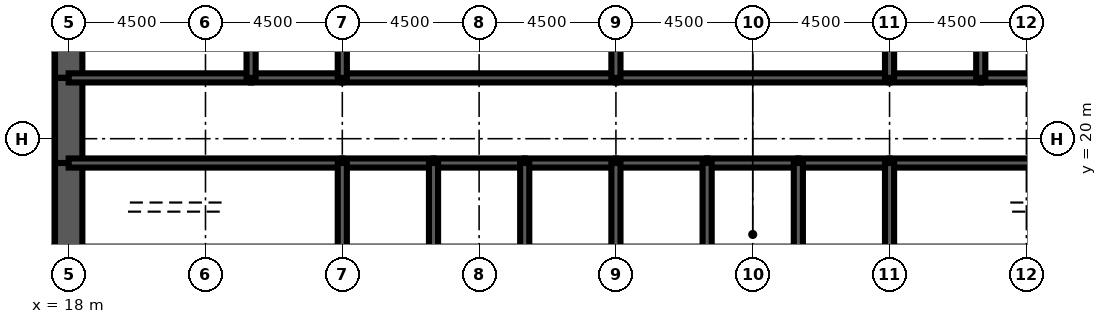
"""IFC4 building model, lengths in metres.
Left out: names, types, materials, properties, quantities, classifications, styles, units other than length and angle.
Written with IfcOpenShell. Run it as: python <this file> out.ifc"""

import sys

from ifc_helpers import new_model, si_unit, direction, frame, frame_2d, origin, place, context, subcontext, project, spatial, rectangle, extrude, element, fill, save


model = new_model("IFC4")
c1 = context("Model", 3, precision=1e-05, world=origin(), true_north=direction((0.0, 1.0)))
c2 = subcontext(c1, "Body", "Model", "MODEL_VIEW")
j1 = project(units=[si_unit("LENGTHUNIT", "METRE"), si_unit("PLANEANGLEUNIT", "RADIAN")], contexts=[c1])
p1 = place(None, origin())
s1 = spatial("IfcSite", under=j1, at=p1, CompositionType="ELEMENT")
p2 = place(p1, origin())
s2 = spatial("IfcBuilding", under=s1, at=p2, CompositionType="ELEMENT")
p3 = place(p2, frame((0.0, 0.0, 113.1)))
s3 = spatial("IfcBuildingStorey", under=s2, at=p3, CompositionType="ELEMENT", Elevation=113.1)
p4 = place(p3, frame((18.0, 26.0, 0.0), z_axis=(0.0, 0.0, 1.0), x_axis=(0.0, -1.0, 0.0)))
e1 = element("IfcWall", 1, at=p4, inside=s3, PredefinedType="SHEAR", context=c2, shape_type="SweptSolid", body=[
    extrude(rectangle(XDim=4.0, YDim=0.9, at=frame_2d((2.0, 0.0))), origin(), (0.0, 0.0, 1.0), 4.2),
])
p5 = place(p3, frame((18.0, 22.0, 0.0), z_axis=(0.0, 0.0, 1.0), x_axis=(0.0, -1.0, 0.0)))
e2 = element("IfcWall", 2, at=p5, inside=s3, PredefinedType="SHEAR", context=c2, shape_type="SweptSolid", body=[
    extrude(rectangle(XDim=2.8, YDim=0.9, at=frame_2d((1.4, 0.0))), origin(), (0.0, 0.0, 1.0), 4.2),
])
p6 = place(p5, frame((0.6, 0.0, 0.0)))
e3 = element("IfcOpeningElement", 3, at=p6, cuts=e2, PredefinedType="OPENING", context=c2, shape_type="SweptSolid", body=[
    extrude(rectangle(XDim=1.8, YDim=2.1, at=frame_2d((0.9, 1.05))), frame((0.0, 0.46, 0.0), z_axis=(0.0, -1.0, 0.0), x_axis=(1.0, 0.0, 0.0)), (0.0, 0.0, 1.0), 0.92),
])
p7 = place(p3, frame((18.0, 19.2, 0.0), z_axis=(0.0, 0.0, 1.0), x_axis=(0.0, -1.0, 0.0)))
e4 = element("IfcWall", 4, at=p7, inside=s3, PredefinedType="SHEAR", context=c2, shape_type="SweptSolid", body=[
    extrude(rectangle(XDim=3.2, YDim=0.9, at=frame_2d((1.6, 0.0))), origin(), (0.0, 0.0, 1.0), 4.2),
])
p8 = place(p3, frame((18.0, 19.2, 0.0), z_axis=(0.0, 0.0, 1.0), x_axis=(1.0, 0.0, 0.0)))
e5 = element("IfcWall", 5, at=p8, inside=s3, PredefinedType="SOLIDWALL", context=c2, shape_type="SweptSolid", body=[
    extrude(rectangle(XDim=9.0, YDim=0.3, at=frame_2d((4.5, 0.0))), origin(), (0.0, 0.0, 1.0), 4.2),
])
p9 = place(p8, frame((0.65, 0.0, 0.0)))
e6 = element("IfcOpeningElement", 6, at=p9, cuts=e5, PredefinedType="OPENING", context=c2, shape_type="SweptSolid", body=[
    extrude(rectangle(XDim=1.0, YDim=2.1, at=frame_2d((0.5, 1.05))), frame((0.0, 0.16, 0.0), z_axis=(0.0, -1.0, 0.0), x_axis=(1.0, 0.0, 0.0)), (0.0, 0.0, 1.0), 0.32),
])
p10 = place(p3, frame((27.0, 19.2, 0.0), z_axis=(0.0, 0.0, 1.0), x_axis=(1.0, 0.0, 0.0)))
e7 = element("IfcWall", 7, at=p10, inside=s3, PredefinedType="SOLIDWALL", context=c2, shape_type="SweptSolid", body=[
    extrude(rectangle(XDim=3.0, YDim=0.3, at=frame_2d((1.5, 0.0))), origin(), (0.0, 0.0, 1.0), 4.2),
])
p11 = place(p10, frame((0.95, 0.0, 0.0)))
e8 = element("IfcOpeningElement", 8, at=p11, cuts=e7, PredefinedType="OPENING", context=c2, shape_type="SweptSolid", body=[
    extrude(rectangle(XDim=1.1, YDim=2.2, at=frame_2d((0.55, 1.1))), frame((0.0, 0.16, 0.0), z_axis=(0.0, -1.0, 0.0), x_axis=(1.0, 0.0, 0.0)), (0.0, 0.0, 1.0), 0.32),
])
p12 = place(p3, frame((30.0, 19.2, 0.0), z_axis=(0.0, 0.0, 1.0), x_axis=(1.0, 0.0, 0.0)))
e9 = element("IfcWall", 9, at=p12, inside=s3, PredefinedType="SOLIDWALL", context=c2, shape_type="SweptSolid", body=[
    extrude(rectangle(XDim=3.0, YDim=0.3, at=frame_2d((1.5, 0.0))), origin(), (0.0, 0.0, 1.0), 4.2),
])
p13 = place(p12, frame((0.95, 0.0, 0.0)))
e10 = element("IfcOpeningElement", 10, at=p13, cuts=e9, PredefinedType="OPENING", context=c2, shape_type="SweptSolid", body=[
    extrude(rectangle(XDim=1.1, YDim=2.2, at=frame_2d((0.55, 1.1))), frame((0.0, 0.16, 0.0), z_axis=(0.0, -1.0, 0.0), x_axis=(1.0, 0.0, 0.0)), (0.0, 0.0, 1.0), 0.32),
])
p14 = place(p3, frame((33.0, 19.2, 0.0), z_axis=(0.0, 0.0, 1.0), x_axis=(1.0, 0.0, 0.0)))
e11 = element("IfcWall", 11, at=p14, inside=s3, PredefinedType="SOLIDWALL", context=c2, shape_type="SweptSolid", body=[
    extrude(rectangle(XDim=3.0, YDim=0.3, at=frame_2d((1.5, 0.0))), origin(), (0.0, 0.0, 1.0), 4.2),
])
p15 = place(p14, frame((0.95, 0.0, 0.0)))
e12 = element("IfcOpeningElement", 12, at=p15, cuts=e11, PredefinedType="OPENING", context=c2, shape_type="SweptSolid", body=[
    extrude(rectangle(XDim=1.1, YDim=2.2, at=frame_2d((0.55, 1.1))), frame((0.0, 0.16, 0.0), z_axis=(0.0, -1.0, 0.0), x_axis=(1.0, 0.0, 0.0)), (0.0, 0.0, 1.0), 0.32),
])
p16 = place(p3, frame((36.0, 19.2, 0.0), z_axis=(0.0, 0.0, 1.0), x_axis=(1.0, 0.0, 0.0)))
e13 = element("IfcWall", 13, at=p16, inside=s3, PredefinedType="SOLIDWALL", context=c2, shape_type="SweptSolid", body=[
    extrude(rectangle(XDim=3.0, YDim=0.3, at=frame_2d((1.5, 0.0))), origin(), (0.0, 0.0, 1.0), 4.2),
])
p17 = place(p16, frame((0.95, 0.0, 0.0)))
e14 = element("IfcOpeningElement", 14, at=p17, cuts=e13, PredefinedType="OPENING", context=c2, shape_type="SweptSolid", body=[
    extrude(rectangle(XDim=1.1, YDim=2.2, at=frame_2d((0.55, 1.1))), frame((0.0, 0.16, 0.0), z_axis=(0.0, -1.0, 0.0), x_axis=(1.0, 0.0, 0.0)), (0.0, 0.0, 1.0), 0.32),
])
p18 = place(p3, frame((39.0, 19.2, 0.0), z_axis=(0.0, 0.0, 1.0), x_axis=(1.0, 0.0, 0.0)))
e15 = element("IfcWall", 15, at=p18, inside=s3, PredefinedType="SOLIDWALL", context=c2, shape_type="SweptSolid", body=[
    extrude(rectangle(XDim=3.0, YDim=0.3, at=frame_2d((1.5, 0.0))), origin(), (0.0, 0.0, 1.0), 4.2),
])
p19 = place(p18, frame((1.0, 0.0, 0.0)))
e16 = element("IfcOpeningElement", 16, at=p19, cuts=e15, PredefinedType="OPENING", context=c2, shape_type="SweptSolid", body=[
    extrude(rectangle(XDim=1.0, YDim=2.1, at=frame_2d((0.5, 1.05))), frame((0.0, 0.16, 0.0), z_axis=(0.0, -1.0, 0.0), x_axis=(1.0, 0.0, 0.0)), (0.0, 0.0, 1.0), 0.32),
])
p20 = place(p3, frame((42.0, 19.2, 0.0), z_axis=(0.0, 0.0, 1.0), x_axis=(1.0, 0.0, 0.0)))
e17 = element("IfcWall", 17, at=p20, inside=s3, PredefinedType="SOLIDWALL", context=c2, shape_type="SweptSolid", body=[
    extrude(rectangle(XDim=3.0, YDim=0.3, at=frame_2d((1.5, 0.0))), origin(), (0.0, 0.0, 1.0), 4.2),
])
p21 = place(p3, frame((45.0, 19.2, 0.0), z_axis=(0.0, 0.0, 1.0), x_axis=(1.0, 0.0, 0.0)))
e18 = element("IfcWall", 18, at=p21, inside=s3, PredefinedType="SOLIDWALL", context=c2, shape_type="SweptSolid", body=[
    extrude(rectangle(XDim=9.0, YDim=0.3, at=frame_2d((4.5, 0.0))), origin(), (0.0, 0.0, 1.0), 4.2),
])
p22 = place(p21, frame((7.35, 0.0, 0.0)))
e19 = element("IfcOpeningElement", 19, at=p22, cuts=e18, PredefinedType="OPENING", context=c2, shape_type="SweptSolid", body=[
    extrude(rectangle(XDim=1.0, YDim=2.1, at=frame_2d((0.5, 1.05))), frame((0.0, 0.16, 0.0), z_axis=(0.0, -1.0, 0.0), x_axis=(1.0, 0.0, 0.0)), (0.0, 0.0, 1.0), 0.32),
])
p23 = place(p3, frame((18.0, 22.0, 0.0), z_axis=(0.0, 0.0, 1.0), x_axis=(1.0, 0.0, 0.0)))
e20 = element("IfcWall", 20, at=p23, inside=s3, PredefinedType="SOLIDWALL", context=c2, shape_type="SweptSolid", body=[
    extrude(rectangle(XDim=6.0, YDim=0.3, at=frame_2d((3.0, 0.0))), origin(), (0.0, 0.0, 1.0), 4.2),
])
p24 = place(p23, frame((4.4, 0.0, 0.0)))
e21 = element("IfcOpeningElement", 21, at=p24, cuts=e20, PredefinedType="OPENING", context=c2, shape_type="SweptSolid", body=[
    extrude(rectangle(XDim=1.0, YDim=2.1, at=frame_2d((0.5, 1.05))), frame((0.0, 0.16, 0.0), z_axis=(0.0, -1.0, 0.0), x_axis=(1.0, 0.0, 0.0)), (0.0, 0.0, 1.0), 0.32),
])
p25 = place(p23, frame((1.0, 0.0, 0.0)))
e22 = element("IfcOpeningElement", 22, at=p25, cuts=e20, PredefinedType="OPENING", context=c2, shape_type="SweptSolid", body=[
    extrude(rectangle(XDim=1.0, YDim=2.1, at=frame_2d((0.5, 1.05))), frame((0.0, 0.16, 0.0), z_axis=(0.0, -1.0, 0.0), x_axis=(1.0, 0.0, 0.0)), (0.0, 0.0, 1.0), 0.32),
])
p26 = place(p3, frame((24.0, 22.0, 0.0), z_axis=(0.0, 0.0, 1.0), x_axis=(1.0, 0.0, 0.0)))
e23 = element("IfcWall", 23, at=p26, inside=s3, PredefinedType="SOLIDWALL", context=c2, shape_type="SweptSolid", body=[
    extrude(rectangle(XDim=3.0, YDim=0.3, at=frame_2d((1.5, 0.0))), origin(), (0.0, 0.0, 1.0), 4.2),
])
p27 = place(p26, frame((1.0, 0.0, 0.0)))
e24 = element("IfcOpeningElement", 24, at=p27, cuts=e23, PredefinedType="OPENING", context=c2, shape_type="SweptSolid", body=[
    extrude(rectangle(XDim=1.0, YDim=2.1, at=frame_2d((0.5, 1.05))), frame((0.0, 0.16, 0.0), z_axis=(0.0, -1.0, 0.0), x_axis=(1.0, 0.0, 0.0)), (0.0, 0.0, 1.0), 0.32),
])
p28 = place(p3, frame((27.0, 22.0, 0.0), z_axis=(0.0, 0.0, 1.0), x_axis=(1.0, 0.0, 0.0)))
e25 = element("IfcWall", 25, at=p28, inside=s3, PredefinedType="SOLIDWALL", context=c2, shape_type="SweptSolid", body=[
    extrude(rectangle(XDim=9.0, YDim=0.3, at=frame_2d((4.5, 0.0))), origin(), (0.0, 0.0, 1.0), 4.2),
])
p29 = place(p28, frame((4.0, 0.0, 0.0)))
e26 = element("IfcOpeningElement", 26, at=p29, cuts=e25, PredefinedType="OPENING", context=c2, shape_type="SweptSolid", body=[
    extrude(rectangle(XDim=1.0, YDim=2.1, at=frame_2d((0.5, 1.05))), frame((0.0, 0.16, 0.0), z_axis=(0.0, -1.0, 0.0), x_axis=(1.0, 0.0, 0.0)), (0.0, 0.0, 1.0), 0.32),
])
p30 = place(p3, frame((36.0, 22.0, 0.0), z_axis=(0.0, 0.0, 1.0), x_axis=(1.0, 0.0, 0.0)))
e27 = element("IfcWall", 27, at=p30, inside=s3, PredefinedType="SOLIDWALL", context=c2, shape_type="SweptSolid", body=[
    extrude(rectangle(XDim=9.0, YDim=0.3, at=frame_2d((4.5, 0.0))), origin(), (0.0, 0.0, 1.0), 4.2),
])
p31 = place(p30, frame((4.0, 0.0, 0.0)))
e28 = element("IfcOpeningElement", 28, at=p31, cuts=e27, PredefinedType="OPENING", context=c2, shape_type="SweptSolid", body=[
    extrude(rectangle(XDim=1.0, YDim=2.1, at=frame_2d((0.5, 1.05))), frame((0.0, 0.16, 0.0), z_axis=(0.0, -1.0, 0.0), x_axis=(1.0, 0.0, 0.0)), (0.0, 0.0, 1.0), 0.32),
])
p32 = place(p3, frame((45.0, 22.0, 0.0), z_axis=(0.0, 0.0, 1.0), x_axis=(1.0, 0.0, 0.0)))
e29 = element("IfcWall", 29, at=p32, inside=s3, PredefinedType="SOLIDWALL", context=c2, shape_type="SweptSolid", body=[
    extrude(rectangle(XDim=3.0, YDim=0.3, at=frame_2d((1.5, 0.0))), origin(), (0.0, 0.0, 1.0), 4.2),
])
p33 = place(p32, frame((1.0, 0.0, 0.0)))
e30 = element("IfcOpeningElement", 30, at=p33, cuts=e29, PredefinedType="OPENING", context=c2, shape_type="SweptSolid", body=[
    extrude(rectangle(XDim=1.0, YDim=2.1, at=frame_2d((0.5, 1.05))), frame((0.0, 0.16, 0.0), z_axis=(0.0, -1.0, 0.0), x_axis=(1.0, 0.0, 0.0)), (0.0, 0.0, 1.0), 0.32),
])
p34 = place(p3, frame((48.0, 22.0, 0.0), z_axis=(0.0, 0.0, 1.0), x_axis=(1.0, 0.0, 0.0)))
e31 = element("IfcWall", 31, at=p34, inside=s3, PredefinedType="SOLIDWALL", context=c2, shape_type="SweptSolid", body=[
    extrude(rectangle(XDim=6.0, YDim=0.3, at=frame_2d((3.0, 0.0))), origin(), (0.0, 0.0, 1.0), 4.2),
])
p35 = place(p34, frame((2.0, 0.0, 0.0)))
e32 = element("IfcOpeningElement", 32, at=p35, cuts=e31, PredefinedType="OPENING", context=c2, shape_type="SweptSolid", body=[
    extrude(rectangle(XDim=1.0, YDim=2.1, at=frame_2d((0.5, 1.05))), frame((0.0, 0.16, 0.0), z_axis=(0.0, -1.0, 0.0), x_axis=(1.0, 0.0, 0.0)), (0.0, 0.0, 1.0), 0.32),
])
p36 = place(p34, frame((4.0, 0.0, 0.0)))
e33 = element("IfcOpeningElement", 33, at=p36, cuts=e31, PredefinedType="OPENING", context=c2, shape_type="SweptSolid", body=[
    extrude(rectangle(XDim=1.0, YDim=2.1, at=frame_2d((0.5, 1.05))), frame((0.0, 0.16, 0.0), z_axis=(0.0, -1.0, 0.0), x_axis=(1.0, 0.0, 0.0)), (0.0, 0.0, 1.0), 0.32),
])
for number, where, z_axis, x_axis in (
    (34, (27.0, 16.0, 0.0), (0.0, 0.0, 1.0), (0.0, 1.0, 0.0)),
    (35, (30.0, 16.0, 0.0), (0.0, 0.0, 1.0), (0.0, 1.0, 0.0)),
    (36, (33.0, 16.0, 0.0), (0.0, 0.0, 1.0), (0.0, 1.0, 0.0)),
    (37, (36.0, 16.0, 0.0), (0.0, 0.0, 1.0), (0.0, 1.0, 0.0)),
    (38, (39.0, 16.0, 0.0), (0.0, 0.0, 1.0), (0.0, 1.0, 0.0)),
    (39, (42.0, 16.0, 0.0), (0.0, 0.0, 1.0), (0.0, 1.0, 0.0)),
    (40, (45.0, 16.0, 0.0), (0.0, 0.0, 1.0), (0.0, 1.0, 0.0)),
):
    element("IfcWall", number, at=place(p3, frame(where, z_axis=z_axis, x_axis=x_axis)), inside=s3, PredefinedType="SOLIDWALL", context=c2, shape_type="SweptSolid", body=[
        extrude(rectangle(XDim=3.2, YDim=0.3, at=frame_2d((1.6, 0.0))), origin(), (0.0, 0.0, 1.0), 4.2),
    ])
for number, where, z_axis, x_axis in (
    (41, (24.0, 22.0, 0.0), (0.0, 0.0, 1.0), (0.0, 1.0, 0.0)),
    (42, (27.0, 22.0, 0.0), (0.0, 0.0, 1.0), (0.0, 1.0, 0.0)),
    (43, (36.0, 22.0, 0.0), (0.0, 0.0, 1.0), (0.0, 1.0, 0.0)),
    (44, (45.0, 22.0, 0.0), (0.0, 0.0, 1.0), (0.0, 1.0, 0.0)),
    (45, (48.0, 22.0, 0.0), (0.0, 0.0, 1.0), (0.0, 1.0, 0.0)),
):
    element("IfcWall", number, at=place(p3, frame(where, z_axis=z_axis, x_axis=x_axis)), inside=s3, PredefinedType="SOLIDWALL", context=c2, shape_type="SweptSolid", body=[
        extrude(rectangle(XDim=4.0, YDim=0.3, at=frame_2d((2.0, 0.0))), origin(), (0.0, 0.0, 1.0), 4.2),
    ])
p37 = place(p3, frame((39.15, 17.4, 0.0), z_axis=(0.0, 0.0, 1.0), x_axis=(1.0, 0.0, 0.0)))
e46 = element("IfcWall", 46, at=p37, inside=s3, PredefinedType="SOLIDWALL", context=c2, shape_type="SweptSolid", body=[
    extrude(rectangle(XDim=2.7, YDim=0.3, at=frame_2d((1.35, 0.0))), origin(), (0.0, 0.0, 1.0), 4.04),
])
p38 = place(p37, frame((0.85, 0.0, 0.0)))
e47 = element("IfcOpeningElement", 47, at=p38, cuts=e46, PredefinedType="OPENING", context=c2, shape_type="SweptSolid", body=[
    extrude(rectangle(XDim=1.0, YDim=2.1, at=frame_2d((0.5, 1.05))), frame((0.0, 0.16, 0.0), z_axis=(0.0, -1.0, 0.0), x_axis=(1.0, 0.0, 0.0)), (0.0, 0.0, 1.0), 0.32),
])
p39 = place(p3, frame((39.0, 22.15, 0.0), z_axis=(0.0, 0.0, 1.0), x_axis=(0.0, 1.0, 0.0)))
e48 = element("IfcWall", 48, at=p39, inside=s3, PredefinedType="PARTITIONING", context=c2, shape_type="SweptSolid", body=[
    extrude(rectangle(XDim=3.7, YDim=0.15, at=frame_2d((1.85, 0.0))), origin(), (0.0, 0.0, 1.0), 3.0),
])
p40 = place(p39, frame((2.2, 0.0, 0.0)))
e49 = element("IfcOpeningElement", 49, at=p40, cuts=e48, PredefinedType="OPENING", context=c2, shape_type="SweptSolid", body=[
    extrude(rectangle(XDim=1.0, YDim=2.1, at=frame_2d((0.5, 1.05))), frame((0.0, 0.085, 0.0), z_axis=(0.0, -1.0, 0.0), x_axis=(1.0, 0.0, 0.0)), (0.0, 0.0, 1.0), 0.17),
])
p41 = place(p3, frame((20.625, 22.15, 0.0), z_axis=(0.0, 0.0, 1.0), x_axis=(0.0, 1.0, 0.0)))
e50 = element("IfcWall", 50, at=p41, inside=s3, PredefinedType="PARTITIONING", context=c2, shape_type="SweptSolid", body=[
    extrude(rectangle(XDim=3.7, YDim=0.15, at=frame_2d((1.85, 0.0))), origin(), (0.0, 0.0, 1.0), 3.0),
])
p42 = place(p3, frame((48.6, 19.35, 0.0), z_axis=(0.0, 0.0, 1.0), x_axis=(0.0, 1.0, 0.0)))
e51 = element("IfcWall", 51, at=p42, inside=s3, PredefinedType="PARTITIONING", context=c2, shape_type="SweptSolid", body=[
    extrude(rectangle(XDim=2.5, YDim=0.15, at=frame_2d((1.25, 0.0))), origin(), (0.0, 0.0, 1.0), 3.0),
])
p43 = place(p42, frame((1.15, 0.0, 0.0)))
e52 = element("IfcOpeningElement", 52, at=p43, cuts=e51, PredefinedType="OPENING", context=c2, shape_type="SweptSolid", body=[
    extrude(rectangle(XDim=1.0, YDim=2.1, at=frame_2d((0.5, 1.05))), frame((0.0, 0.085, 0.0), z_axis=(0.0, -1.0, 0.0), x_axis=(1.0, 0.0, 0.0)), (0.0, 0.0, 1.0), 0.17),
])
p44 = place(p38, origin())
e53 = element("IfcDoor", 53, at=p44, inside=s3, OperationType="SINGLE_SWING_LEFT", PredefinedType="DOOR", context=c2, shape_type="SweptSolid", body=[
    extrude(rectangle(XDim=1.0, YDim=2.1, at=frame_2d((0.5, 1.05))), frame((0.0, 0.025, 0.0), z_axis=(0.0, -1.0, 0.0), x_axis=(1.0, 0.0, 0.0)), (0.0, 0.0, 1.0), 0.05),
])
fill(e47, e53)
p45 = place(p43, origin())
e54 = element("IfcDoor", 54, at=p45, inside=s3, OperationType="SINGLE_SWING_RIGHT", PredefinedType="DOOR", context=c2, shape_type="SweptSolid", body=[
    extrude(rectangle(XDim=1.0, YDim=2.1, at=frame_2d((0.5, 1.05))), frame((0.0, 0.025, 0.0), z_axis=(0.0, -1.0, 0.0), x_axis=(1.0, 0.0, 0.0)), (0.0, 0.0, 1.0), 0.05),
])
fill(e52, e54)
p46 = place(p11, origin())
e55 = element("IfcDoor", 55, at=p46, inside=s3, OperationType="DOUBLE_DOOR_SLIDING", PredefinedType="USERDEFINED", context=c2, shape_type="SweptSolid", body=[
    extrude(rectangle(XDim=1.1, YDim=2.2, at=frame_2d((0.55, 1.1))), frame((0.0, 0.025, 0.0), z_axis=(0.0, -1.0, 0.0), x_axis=(1.0, 0.0, 0.0)), (0.0, 0.0, 1.0), 0.05),
])
fill(e8, e55)
p47 = place(p13, origin())
e56 = element("IfcDoor", 56, at=p47, inside=s3, OperationType="DOUBLE_DOOR_SLIDING", PredefinedType="USERDEFINED", context=c2, shape_type="SweptSolid", body=[
    extrude(rectangle(XDim=1.1, YDim=2.2, at=frame_2d((0.55, 1.1))), frame((0.0, 0.025, 0.0), z_axis=(0.0, -1.0, 0.0), x_axis=(1.0, 0.0, 0.0)), (0.0, 0.0, 1.0), 0.05),
])
fill(e10, e56)
p48 = place(p15, origin())
e57 = element("IfcDoor", 57, at=p48, inside=s3, OperationType="DOUBLE_DOOR_SLIDING", PredefinedType="USERDEFINED", context=c2, shape_type="SweptSolid", body=[
    extrude(rectangle(XDim=1.1, YDim=2.2, at=frame_2d((0.55, 1.1))), frame((0.0, 0.025, 0.0), z_axis=(0.0, -1.0, 0.0), x_axis=(1.0, 0.0, 0.0)), (0.0, 0.0, 1.0), 0.05),
])
fill(e12, e57)
p49 = place(p17, origin())
e58 = element("IfcDoor", 58, at=p49, inside=s3, OperationType="DOUBLE_DOOR_SLIDING", PredefinedType="USERDEFINED", context=c2, shape_type="SweptSolid", body=[
    extrude(rectangle(XDim=1.1, YDim=2.2, at=frame_2d((0.55, 1.1))), frame((0.0, 0.025, 0.0), z_axis=(0.0, -1.0, 0.0), x_axis=(1.0, 0.0, 0.0)), (0.0, 0.0, 1.0), 0.05),
])
fill(e14, e58)
p50 = place(p9, origin())
e59 = element("IfcDoor", 59, at=p50, inside=s3, OperationType="SINGLE_SWING_LEFT", PredefinedType="DOOR", context=c2, shape_type="SweptSolid", body=[
    extrude(rectangle(XDim=1.0, YDim=2.1, at=frame_2d((0.5, 1.05))), frame((0.0, 0.025, 0.0), z_axis=(0.0, -1.0, 0.0), x_axis=(1.0, 0.0, 0.0)), (0.0, 0.0, 1.0), 0.05),
])
fill(e6, e59)
p51 = place(p6, origin())
e60 = element("IfcDoor", 60, at=p51, inside=s3, OperationType="SINGLE_SWING_LEFT", PredefinedType="DOOR", context=c2, shape_type="SweptSolid", body=[
    extrude(rectangle(XDim=1.8, YDim=2.1, at=frame_2d((0.9, 1.05))), frame((0.0, 0.45, 0.0), z_axis=(0.0, -1.0, 0.0), x_axis=(1.0, 0.0, 0.0)), (0.0, 0.0, 1.0), 0.899),
])
fill(e3, e60)
p52 = place(p24, origin())
e61 = element("IfcDoor", 61, at=p52, inside=s3, OperationType="SINGLE_SWING_RIGHT", PredefinedType="DOOR", context=c2, shape_type="SweptSolid", body=[
    extrude(rectangle(XDim=1.0, YDim=2.1, at=frame_2d((0.5, 1.05))), frame((0.0, 0.025, 0.0), z_axis=(0.0, -1.0, 0.0), x_axis=(1.0, 0.0, 0.0)), (0.0, 0.0, 1.0), 0.05),
])
fill(e21, e61)
p53 = place(p27, origin())
e62 = element("IfcDoor", 62, at=p53, inside=s3, OperationType="SINGLE_SWING_LEFT", PredefinedType="DOOR", context=c2, shape_type="SweptSolid", body=[
    extrude(rectangle(XDim=1.0, YDim=2.1, at=frame_2d((0.5, 1.05))), frame((0.0, 0.025, 0.0), z_axis=(0.0, -1.0, 0.0), x_axis=(1.0, 0.0, 0.0)), (0.0, 0.0, 1.0), 0.05),
])
fill(e24, e62)
p54 = place(p29, origin())
e63 = element("IfcDoor", 63, at=p54, inside=s3, OperationType="SINGLE_SWING_LEFT", PredefinedType="DOOR", context=c2, shape_type="SweptSolid", body=[
    extrude(rectangle(XDim=1.0, YDim=2.1, at=frame_2d((0.5, 1.05))), frame((0.0, 0.025, 0.0), z_axis=(0.0, -1.0, 0.0), x_axis=(1.0, 0.0, 0.0)), (0.0, 0.0, 1.0), 0.05),
])
fill(e26, e63)
p55 = place(p31, origin())
e64 = element("IfcDoor", 64, at=p55, inside=s3, OperationType="SINGLE_SWING_LEFT", PredefinedType="DOOR", context=c2, shape_type="SweptSolid", body=[
    extrude(rectangle(XDim=1.0, YDim=2.1, at=frame_2d((0.5, 1.05))), frame((0.0, 0.025, 0.0), z_axis=(0.0, -1.0, 0.0), x_axis=(1.0, 0.0, 0.0)), (0.0, 0.0, 1.0), 0.05),
])
fill(e28, e64)
p56 = place(p33, origin())
e65 = element("IfcDoor", 65, at=p56, inside=s3, OperationType="SINGLE_SWING_LEFT", PredefinedType="DOOR", context=c2, shape_type="SweptSolid", body=[
    extrude(rectangle(XDim=1.0, YDim=2.1, at=frame_2d((0.5, 1.05))), frame((0.0, 0.025, 0.0), z_axis=(0.0, -1.0, 0.0), x_axis=(1.0, 0.0, 0.0)), (0.0, 0.0, 1.0), 0.05),
])
fill(e30, e65)
p57 = place(p25, origin())
e66 = element("IfcDoor", 66, at=p57, inside=s3, OperationType="SINGLE_SWING_LEFT", PredefinedType="DOOR", context=c2, shape_type="SweptSolid", body=[
    extrude(rectangle(XDim=1.0, YDim=2.1, at=frame_2d((0.5, 1.05))), frame((0.0, 0.025, 0.0), z_axis=(0.0, -1.0, 0.0), x_axis=(1.0, 0.0, 0.0)), (0.0, 0.0, 1.0), 0.05),
])
fill(e22, e66)
p58 = place(p19, origin())
e67 = element("IfcDoor", 67, at=p58, inside=s3, OperationType="SINGLE_SWING_LEFT", PredefinedType="DOOR", context=c2, shape_type="SweptSolid", body=[
    extrude(rectangle(XDim=1.0, YDim=2.1, at=frame_2d((0.5, 1.05))), frame((0.0, 0.025, 0.0), z_axis=(0.0, -1.0, 0.0), x_axis=(1.0, 0.0, 0.0)), (0.0, 0.0, 1.0), 0.05),
])
fill(e16, e67)
save(model, sys.argv[1])
